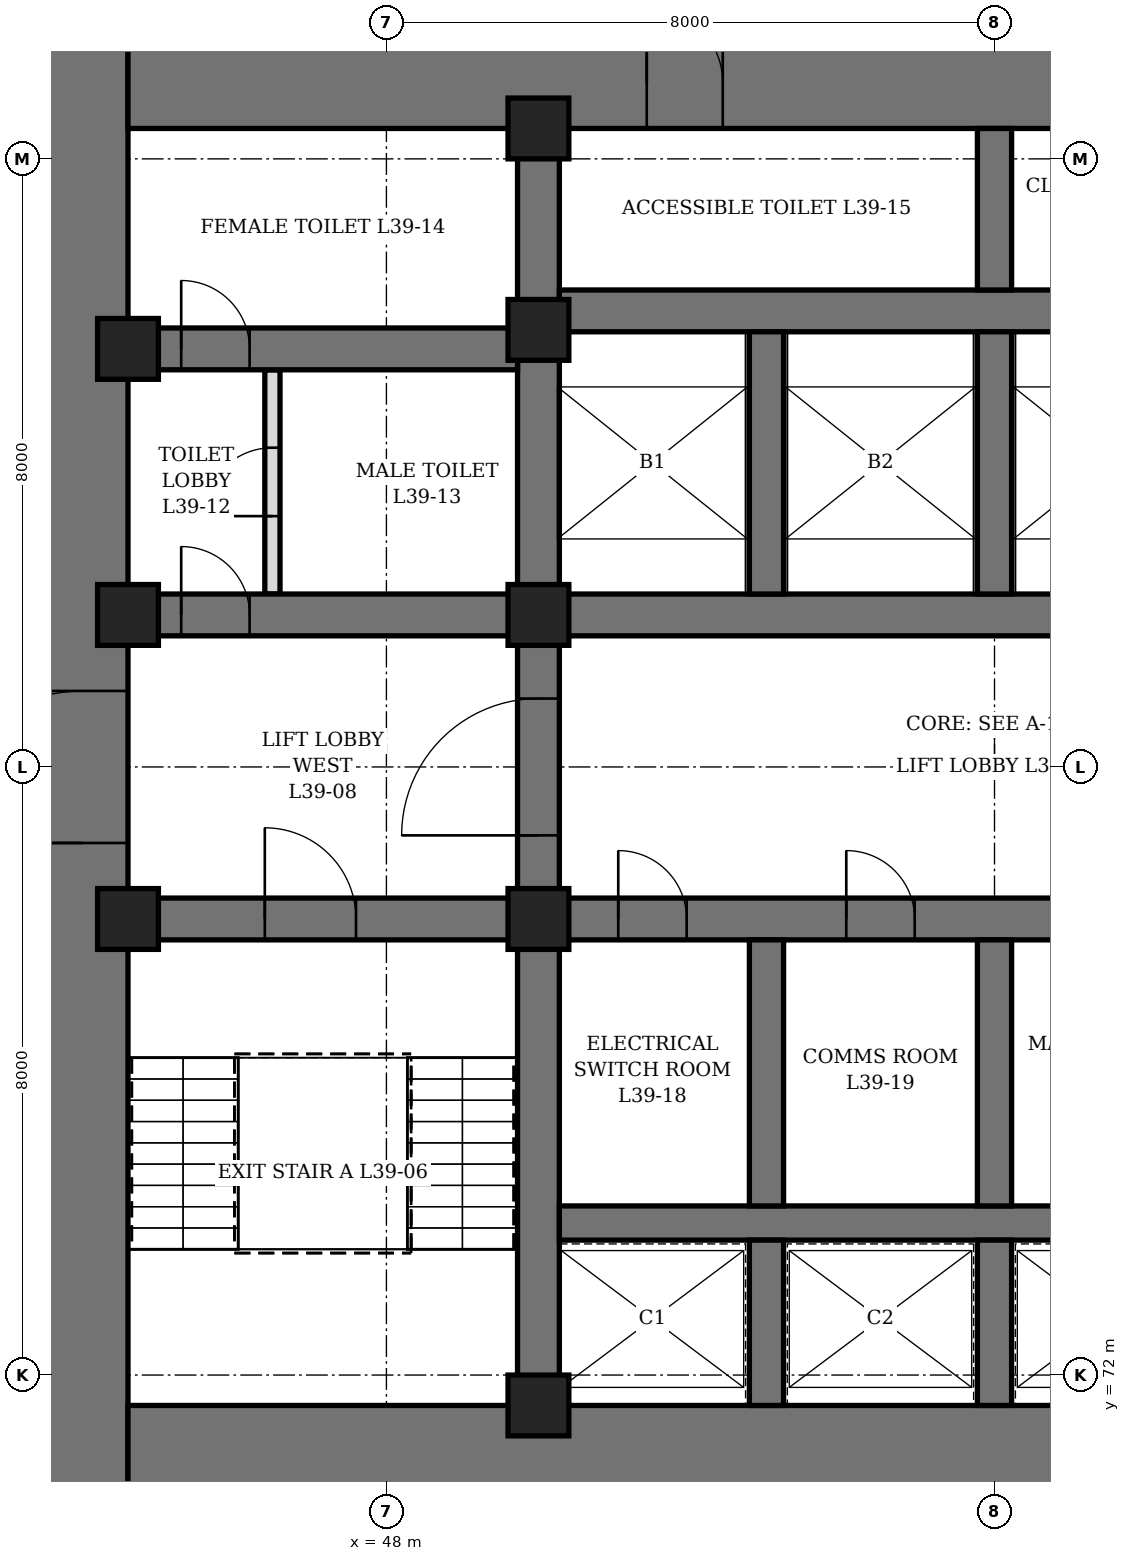
"""IFC4 building model, lengths in metres.
Left out: names, types, materials, properties, quantities, classifications, styles, units other than length and angle.
Written with IfcOpenShell. Run it as: python <this file> out.ifc"""

import sys

from ifc_helpers import new_model, si_unit, direction, frame, frame_2d, origin, origin_2d, place, context, subcontext, project, spatial, rectangle, hollow_rectangle, extrude, element, fill, save


model = new_model("IFC4")
c1 = context("Model", 3, precision=1e-05, world=origin(), true_north=direction((0.0, 1.0)))
c2 = subcontext(c1, "Body", "Model", "MODEL_VIEW")
j1 = project(units=[si_unit("LENGTHUNIT", "METRE"), si_unit("PLANEANGLEUNIT", "RADIAN")], contexts=[c1])
p1 = place(None, origin())
s1 = spatial("IfcSite", under=j1, at=p1, CompositionType="ELEMENT")
p2 = place(p1, origin())
s2 = spatial("IfcBuilding", under=s1, at=p2, CompositionType="ELEMENT")
p3 = place(p2, frame((0.0, 0.0, 175.3)))
s3 = spatial("IfcBuildingStorey", under=s2, at=p3, CompositionType="ELEMENT", Elevation=175.3)
p4 = place(p3, frame((44.0, 70.4, 0.0), z_axis=(0.0, 0.0, 1.0), x_axis=(0.0, 1.0, 0.0)))
e1 = element("IfcWall", 1, at=p4, inside=s3, PredefinedType="SHEAR", context=c2, shape_type="SweptSolid", body=[
    extrude(rectangle(XDim=19.2, YDim=1.2, at=frame_2d((9.6, 0.0))), origin(), (0.0, 0.0, 1.0), 6.0),
])
p5 = place(p4, frame((8.6, 0.0, 0.0)))
e2 = element("IfcOpeningElement", 2, at=p5, cuts=e1, PredefinedType="OPENING", context=c2, shape_type="SweptSolid", body=[
    extrude(rectangle(XDim=2.0, YDim=2.4, at=frame_2d((1.0, 1.2))), frame((0.0, 0.61, 0.0), z_axis=(0.0, -1.0, 0.0), x_axis=(1.0, 0.0, 0.0)), (0.0, 0.0, 1.0), 1.22),
])
p6 = place(p3, frame((44.6, 71.0, 0.0), z_axis=(0.0, 0.0, 1.0), x_axis=(1.0, 0.0, 0.0)))
e3 = element("IfcWall", 3, at=p6, inside=s3, PredefinedType="SHEAR", context=c2, shape_type="SweptSolid", body=[
    extrude(rectangle(XDim=22.8, YDim=1.2, at=frame_2d((11.4, 0.0))), origin(), (0.0, 0.0, 1.0), 6.0),
])
p7 = place(p3, frame((44.6, 89.0, 0.0), z_axis=(0.0, 0.0, 1.0), x_axis=(1.0, 0.0, 0.0)))
e4 = element("IfcWall", 4, at=p7, inside=s3, PredefinedType="SHEAR", context=c2, shape_type="SweptSolid", body=[
    extrude(rectangle(XDim=22.8, YDim=1.2, at=frame_2d((11.4, 0.0))), origin(), (0.0, 0.0, 1.0), 6.0),
])
p8 = place(p7, frame((6.825, 0.0, 0.0)))
e5 = element("IfcOpeningElement", 5, at=p8, cuts=e4, PredefinedType="OPENING", context=c2, shape_type="SweptSolid", body=[
    extrude(rectangle(XDim=1.0, YDim=2.1, at=frame_2d((0.5, 1.05))), frame((0.0, 0.61, 0.0), z_axis=(0.0, -1.0, 0.0), x_axis=(1.0, 0.0, 0.0)), (0.0, 0.0, 1.0), 1.22),
])
p9 = place(p7, frame((13.038, 0.0, 0.0)))
e6 = element("IfcOpeningElement", 6, at=p9, cuts=e4, PredefinedType="OPENING", context=c2, shape_type="SweptSolid", body=[
    extrude(rectangle(XDim=0.9, YDim=2.1, at=frame_2d((0.45, 1.05))), frame((0.0, 0.61, 0.0), z_axis=(0.0, -1.0, 0.0), x_axis=(1.0, 0.0, 0.0)), (0.0, 0.0, 1.0), 1.22),
])
p10 = place(p3, frame((50.0, 71.6, 0.0), z_axis=(0.0, 0.0, 1.0), x_axis=(0.0, 1.0, 0.0)))
e7 = element("IfcWall", 7, at=p10, inside=s3, PredefinedType="SHEAR", context=c2, shape_type="SweptSolid", body=[
    extrude(rectangle(XDim=16.8, YDim=0.55, at=frame_2d((8.4, 0.0))), origin(), (0.0, 0.0, 1.0), 6.0),
])
p11 = place(p10, frame((7.5, 0.0, 0.0)))
e8 = element("IfcOpeningElement", 8, at=p11, cuts=e7, PredefinedType="OPENING", context=c2, shape_type="SweptSolid", body=[
    extrude(rectangle(XDim=1.8, YDim=2.4, at=frame_2d((0.9, 1.2))), frame((0.0, 0.285, 0.0), z_axis=(0.0, -1.0, 0.0), x_axis=(1.0, 0.0, 0.0)), (0.0, 0.0, 1.0), 0.57),
])
p12 = place(p3, frame((44.6, 78.0, 0.0), z_axis=(0.0, 0.0, 1.0), x_axis=(1.0, 0.0, 0.0)))
e9 = element("IfcWall", 9, at=p12, inside=s3, PredefinedType="SHEAR", context=c2, shape_type="SweptSolid", body=[
    extrude(rectangle(XDim=5.125, YDim=0.55, at=frame_2d((2.562, 0.0))), origin(), (0.0, 0.0, 1.0), 6.0),
])
p13 = place(p12, frame((1.8, 0.0, 0.0)))
e10 = element("IfcOpeningElement", 10, at=p13, cuts=e9, PredefinedType="OPENING", context=c2, shape_type="SweptSolid", body=[
    extrude(rectangle(XDim=1.2, YDim=2.1, at=frame_2d((0.6, 1.05))), frame((0.0, 0.285, 0.0), z_axis=(0.0, -1.0, 0.0), x_axis=(1.0, 0.0, 0.0)), (0.0, 0.0, 1.0), 0.57),
])
p14 = place(p3, frame((44.6, 82.0, 0.0), z_axis=(0.0, 0.0, 1.0), x_axis=(1.0, 0.0, 0.0)))
e11 = element("IfcWall", 11, at=p14, inside=s3, PredefinedType="SHEAR", context=c2, shape_type="SweptSolid", body=[
    extrude(rectangle(XDim=5.125, YDim=0.55, at=frame_2d((2.562, 0.0))), origin(), (0.0, 0.0, 1.0), 6.0),
])
p15 = place(p14, frame((0.7, 0.0, 0.0)))
e12 = element("IfcOpeningElement", 12, at=p15, cuts=e11, PredefinedType="OPENING", context=c2, shape_type="SweptSolid", body=[
    extrude(rectangle(XDim=0.9, YDim=2.1, at=frame_2d((0.45, 1.05))), frame((0.0, 0.285, 0.0), z_axis=(0.0, -1.0, 0.0), x_axis=(1.0, 0.0, 0.0)), (0.0, 0.0, 1.0), 0.57),
])
p16 = place(p3, frame((44.6, 85.5, 0.0), z_axis=(0.0, 0.0, 1.0), x_axis=(1.0, 0.0, 0.0)))
e13 = element("IfcWall", 13, at=p16, inside=s3, PredefinedType="SHEAR", context=c2, shape_type="SweptSolid", body=[
    extrude(rectangle(XDim=5.125, YDim=0.55, at=frame_2d((2.562, 0.0))), origin(), (0.0, 0.0, 1.0), 6.0),
])
p17 = place(p16, frame((0.7, 0.0, 0.0)))
e14 = element("IfcOpeningElement", 14, at=p17, cuts=e13, PredefinedType="OPENING", context=c2, shape_type="SweptSolid", body=[
    extrude(rectangle(XDim=0.9, YDim=2.1, at=frame_2d((0.45, 1.05))), frame((0.0, 0.285, 0.0), z_axis=(0.0, -1.0, 0.0), x_axis=(1.0, 0.0, 0.0)), (0.0, 0.0, 1.0), 0.57),
])
p18 = place(p3, frame((50.275, 78.0, 0.0), z_axis=(0.0, 0.0, 1.0), x_axis=(1.0, 0.0, 0.0)))
e15 = element("IfcWall", 15, at=p18, inside=s3, PredefinedType="SHEAR", context=c2, shape_type="SweptSolid", body=[
    extrude(rectangle(XDim=11.45, YDim=0.55, at=frame_2d((5.725, 0.0))), origin(), (0.0, 0.0, 1.0), 6.0),
])
p19 = place(p18, frame((0.775, 0.0, 0.0)))
e16 = element("IfcOpeningElement", 16, at=p19, cuts=e15, PredefinedType="OPENING", context=c2, shape_type="SweptSolid", body=[
    extrude(rectangle(XDim=0.9, YDim=2.1, at=frame_2d((0.45, 1.05))), frame((0.0, 0.285, 0.0), z_axis=(0.0, -1.0, 0.0), x_axis=(1.0, 0.0, 0.0)), (0.0, 0.0, 1.0), 0.57),
])
p20 = place(p18, frame((3.775, 0.0, 0.0)))
e17 = element("IfcOpeningElement", 17, at=p20, cuts=e15, PredefinedType="OPENING", context=c2, shape_type="SweptSolid", body=[
    extrude(rectangle(XDim=0.9, YDim=2.1, at=frame_2d((0.45, 1.05))), frame((0.0, 0.285, 0.0), z_axis=(0.0, -1.0, 0.0), x_axis=(1.0, 0.0, 0.0)), (0.0, 0.0, 1.0), 0.57),
])
p21 = place(p18, frame((6.775, 0.0, 0.0)))
e18 = element("IfcOpeningElement", 18, at=p21, cuts=e15, PredefinedType="OPENING", context=c2, shape_type="SweptSolid", body=[
    extrude(rectangle(XDim=0.9, YDim=2.1, at=frame_2d((0.45, 1.05))), frame((0.0, 0.285, 0.0), z_axis=(0.0, -1.0, 0.0), x_axis=(1.0, 0.0, 0.0)), (0.0, 0.0, 1.0), 0.57),
])
p22 = place(p18, frame((9.775, 0.0, 0.0)))
e19 = element("IfcOpeningElement", 19, at=p22, cuts=e15, PredefinedType="OPENING", context=c2, shape_type="SweptSolid", body=[
    extrude(rectangle(XDim=0.9, YDim=2.1, at=frame_2d((0.45, 1.05))), frame((0.0, 0.285, 0.0), z_axis=(0.0, -1.0, 0.0), x_axis=(1.0, 0.0, 0.0)), (0.0, 0.0, 1.0), 0.57),
])
for number, where, z_axis, x_axis in (
    (20, (50.275, 82.0, 0.0), (0.0, 0.0, 1.0), (1.0, 0.0, 0.0)),
    (21, (50.275, 86.0, 0.0), (0.0, 0.0, 1.0), (1.0, 0.0, 0.0)),
):
    element("IfcWall", number, at=place(p3, frame(where, z_axis=z_axis, x_axis=x_axis)), inside=s3, PredefinedType="SHEAR", context=c2, shape_type="SweptSolid", body=[
        extrude(rectangle(XDim=11.45, YDim=0.55, at=frame_2d((5.725, 0.0))), origin(), (0.0, 0.0, 1.0), 6.0),
    ])
p23 = place(p3, frame((50.275, 74.0, 0.0), z_axis=(0.0, 0.0, 1.0), x_axis=(1.0, 0.0, 0.0)))
e22 = element("IfcWall", 22, at=p23, inside=s3, PredefinedType="SHEAR", context=c2, shape_type="SweptSolid", body=[
    extrude(rectangle(XDim=11.45, YDim=0.45, at=frame_2d((5.725, 0.0))), origin(), (0.0, 0.0, 1.0), 6.0),
])
p24 = place(p3, frame((53.0, 71.6, 0.0), z_axis=(0.0, 0.0, 1.0), x_axis=(0.0, 1.0, 0.0)))
e23 = element("IfcWall", 23, at=p24, inside=s3, PredefinedType="SHEAR", context=c2, shape_type="SweptSolid", body=[
    extrude(rectangle(XDim=2.175, YDim=0.45, at=frame_2d((1.087, 0.0))), origin(), (0.0, 0.0, 1.0), 6.0),
])
p25 = place(p3, frame((53.0, 74.225, 0.0), z_axis=(0.0, 0.0, 1.0), x_axis=(0.0, 1.0, 0.0)))
e24 = element("IfcWall", 24, at=p25, inside=s3, PredefinedType="SHEAR", context=c2, shape_type="SweptSolid", body=[
    extrude(rectangle(XDim=3.5, YDim=0.45, at=frame_2d((1.75, 0.0))), origin(), (0.0, 0.0, 1.0), 6.0),
])
p26 = place(p3, frame((53.0, 82.275, 0.0), z_axis=(0.0, 0.0, 1.0), x_axis=(0.0, 1.0, 0.0)))
e25 = element("IfcWall", 25, at=p26, inside=s3, PredefinedType="SHEAR", context=c2, shape_type="SweptSolid", body=[
    extrude(rectangle(XDim=3.45, YDim=0.45, at=frame_2d((1.725, 0.0))), origin(), (0.0, 0.0, 1.0), 6.0),
])
p27 = place(p3, frame((56.0, 71.6, 0.0), z_axis=(0.0, 0.0, 1.0), x_axis=(0.0, 1.0, 0.0)))
e26 = element("IfcWall", 26, at=p27, inside=s3, PredefinedType="SHEAR", context=c2, shape_type="SweptSolid", body=[
    extrude(rectangle(XDim=2.175, YDim=0.45, at=frame_2d((1.087, 0.0))), origin(), (0.0, 0.0, 1.0), 6.0),
])
p28 = place(p3, frame((56.0, 74.225, 0.0), z_axis=(0.0, 0.0, 1.0), x_axis=(0.0, 1.0, 0.0)))
e27 = element("IfcWall", 27, at=p28, inside=s3, PredefinedType="SHEAR", context=c2, shape_type="SweptSolid", body=[
    extrude(rectangle(XDim=3.5, YDim=0.45, at=frame_2d((1.75, 0.0))), origin(), (0.0, 0.0, 1.0), 6.0),
])
p29 = place(p3, frame((56.0, 82.275, 0.0), z_axis=(0.0, 0.0, 1.0), x_axis=(0.0, 1.0, 0.0)))
e28 = element("IfcWall", 28, at=p29, inside=s3, PredefinedType="SHEAR", context=c2, shape_type="SweptSolid", body=[
    extrude(rectangle(XDim=3.45, YDim=0.45, at=frame_2d((1.725, 0.0))), origin(), (0.0, 0.0, 1.0), 6.0),
])
p30 = place(p3, frame((56.0, 86.275, 0.0), z_axis=(0.0, 0.0, 1.0), x_axis=(0.0, 1.0, 0.0)))
e29 = element("IfcWall", 29, at=p30, inside=s3, PredefinedType="SHEAR", context=c2, shape_type="SweptSolid", body=[
    extrude(rectangle(XDim=2.125, YDim=0.45, at=frame_2d((1.062, 0.0))), origin(), (0.0, 0.0, 1.0), 6.0),
])
for number, where, z_axis, x_axis in (
    (30, (44.6, 78.0, 0.0), (0.0, 0.0, 1.0), (1.0, 0.0, 0.0)),
    (31, (44.6, 82.0, 0.0), (0.0, 0.0, 1.0), (1.0, 0.0, 0.0)),
    (32, (44.6, 85.5, 0.0), (0.0, 0.0, 1.0), (1.0, 0.0, 0.0)),
    (33, (50.0, 71.6, 0.0), (0.0, 0.0, 1.0), (1.0, 0.0, 0.0)),
    (34, (50.0, 78.0, 0.0), (0.0, 0.0, 1.0), (1.0, 0.0, 0.0)),
    (35, (50.0, 82.0, 0.0), (0.0, 0.0, 1.0), (1.0, 0.0, 0.0)),
    (36, (50.0, 85.75, 0.0), (0.0, 0.0, 1.0), (1.0, 0.0, 0.0)),
    (37, (50.0, 88.4, 0.0), (0.0, 0.0, 1.0), (1.0, 0.0, 0.0)),
):
    element("IfcColumn", number, at=place(p3, frame(where, z_axis=z_axis, x_axis=x_axis)), inside=s3, PredefinedType="COLUMN", context=c2, shape_type="SweptSolid", body=[
        extrude(hollow_rectangle(XDim=0.8, YDim=0.8, WallThickness=0.1, at=origin_2d()), origin(), (0.0, 0.0, 1.0), 6.0),
    ])
p31 = place(p3, frame((46.5, 82.275, 0.0), z_axis=(0.0, 0.0, 1.0), x_axis=(0.0, 1.0, 0.0)))
e38 = element("IfcWall", 38, at=p31, inside=s3, PredefinedType="PARTITIONING", context=c2, shape_type="SweptSolid", body=[
    extrude(rectangle(XDim=2.95, YDim=0.2, at=frame_2d((1.475, 0.0))), origin(), (0.0, 0.0, 1.0), 5.75),
])
p32 = place(p31, frame((1.025, 0.0, 0.0)))
e39 = element("IfcOpeningElement", 39, at=p32, cuts=e38, PredefinedType="OPENING", context=c2, shape_type="SweptSolid", body=[
    extrude(rectangle(XDim=0.9, YDim=2.1, at=frame_2d((0.45, 1.05))), frame((0.0, 0.11, 0.0), z_axis=(0.0, -1.0, 0.0), x_axis=(1.0, 0.0, 0.0)), (0.0, 0.0, 1.0), 0.22),
])
p33 = place(p15, origin())
e40 = element("IfcDoor", 40, at=p33, inside=s3, OperationType="SINGLE_SWING_LEFT", PredefinedType="DOOR", context=c2, shape_type="SweptSolid", body=[
    extrude(rectangle(XDim=0.9, YDim=2.1, at=frame_2d((0.45, 1.05))), frame((0.0, 0.275, 0.0), z_axis=(0.0, -1.0, 0.0), x_axis=(1.0, 0.0, 0.0)), (0.0, 0.0, 1.0), 0.55),
])
fill(e12, e40)
p34 = place(p32, origin())
e41 = element("IfcDoor", 41, at=p34, inside=s3, OperationType="SINGLE_SWING_RIGHT", PredefinedType="DOOR", context=c2, shape_type="SweptSolid", body=[
    extrude(rectangle(XDim=0.9, YDim=2.1, at=frame_2d((0.45, 1.05))), frame((0.0, 0.1, 0.0), z_axis=(0.0, -1.0, 0.0), x_axis=(1.0, 0.0, 0.0)), (0.0, 0.0, 1.0), 0.199),
])
fill(e39, e41)
p35 = place(p17, origin())
e42 = element("IfcDoor", 42, at=p35, inside=s3, OperationType="SINGLE_SWING_RIGHT", PredefinedType="DOOR", context=c2, shape_type="SweptSolid", body=[
    extrude(rectangle(XDim=0.9, YDim=2.1, at=frame_2d((0.45, 1.05))), frame((0.0, 0.275, 0.0), z_axis=(0.0, -1.0, 0.0), x_axis=(1.0, 0.0, 0.0)), (0.0, 0.0, 1.0), 0.55),
])
fill(e14, e42)
p36 = place(p8, origin())
e43 = element("IfcDoor", 43, at=p36, inside=s3, OperationType="SINGLE_SWING_LEFT", PredefinedType="DOOR", context=c2, shape_type="SweptSolid", body=[
    extrude(rectangle(XDim=1.0, YDim=2.1, at=frame_2d((0.5, 1.05))), frame((0.0, 0.35, 0.0), z_axis=(0.0, -1.0, 0.0), x_axis=(1.0, 0.0, 0.0)), (0.0, 0.0, 1.0), 0.7),
])
fill(e5, e43)
p37 = place(p19, origin())
e44 = element("IfcDoor", 44, at=p37, inside=s3, OperationType="SINGLE_SWING_LEFT", PredefinedType="DOOR", context=c2, shape_type="SweptSolid", body=[
    extrude(rectangle(XDim=0.9, YDim=2.1, at=frame_2d((0.45, 1.05))), frame((0.0, 0.275, 0.0), z_axis=(0.0, -1.0, 0.0), x_axis=(1.0, 0.0, 0.0)), (0.0, 0.0, 1.0), 0.55),
])
fill(e16, e44)
p38 = place(p20, origin())
e45 = element("IfcDoor", 45, at=p38, inside=s3, OperationType="SINGLE_SWING_LEFT", PredefinedType="DOOR", context=c2, shape_type="SweptSolid", body=[
    extrude(rectangle(XDim=0.9, YDim=2.1, at=frame_2d((0.45, 1.05))), frame((0.0, 0.275, 0.0), z_axis=(0.0, -1.0, 0.0), x_axis=(1.0, 0.0, 0.0)), (0.0, 0.0, 1.0), 0.55),
])
fill(e17, e45)
p39 = place(p13, origin())
e46 = element("IfcDoor", 46, at=p39, inside=s3, OperationType="SINGLE_SWING_LEFT", PredefinedType="DOOR", context=c2, shape_type="SweptSolid", body=[
    extrude(rectangle(XDim=1.2, YDim=2.1, at=frame_2d((0.6, 1.05))), frame((0.0, 0.275, 0.0), z_axis=(0.0, -1.0, 0.0), x_axis=(1.0, 0.0, 0.0)), (0.0, 0.0, 1.0), 0.55),
])
fill(e10, e46)
p40 = place(p5, origin())
e47 = element("IfcDoor", 47, at=p40, inside=s3, OperationType="DOUBLE_DOOR_SINGLE_SWING", PredefinedType="DOOR", context=c2, shape_type="SweptSolid", body=[
    extrude(rectangle(XDim=2.0, YDim=2.4, at=frame_2d((1.0, 1.2))), frame((0.0, 0.35, 0.0), z_axis=(0.0, -1.0, 0.0), x_axis=(1.0, 0.0, 0.0)), (0.0, 0.0, 1.0), 0.7),
])
fill(e2, e47)
p41 = place(p11, origin())
e48 = element("IfcDoor", 48, at=p41, inside=s3, OperationType="DOUBLE_DOOR_SINGLE_SWING", PredefinedType="DOOR", context=c2, shape_type="SweptSolid", body=[
    extrude(rectangle(XDim=1.8, YDim=2.4, at=frame_2d((0.9, 1.2))), frame((0.0, 0.275, 0.0), z_axis=(0.0, -1.0, 0.0), x_axis=(1.0, 0.0, 0.0)), (0.0, 0.0, 1.0), 0.55),
])
fill(e8, e48)
save(model, sys.argv[1])
